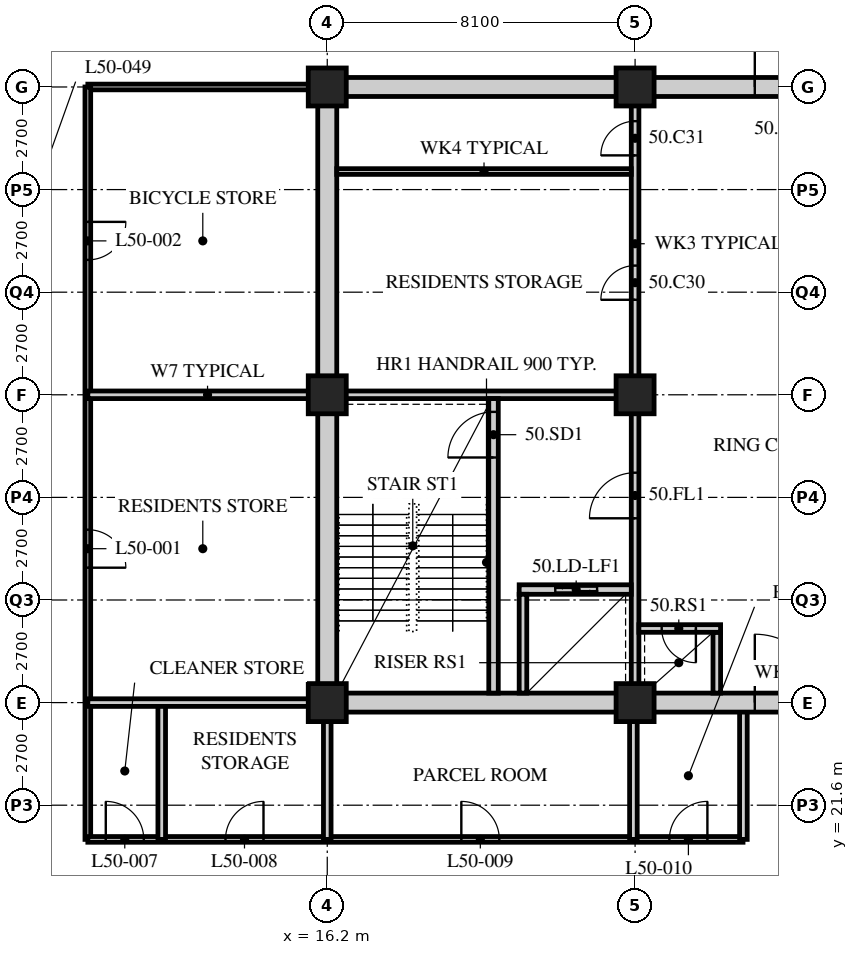
"""IFC4 building model, lengths in metres.
Left out: names, types, materials, properties, quantities, classifications, styles, units other than length and angle.
Written with IfcOpenShell. Run it as: python <this file> out.ifc"""

import sys

from ifc_helpers import new_model, si_unit, direction, frame, frame_2d, origin, origin_2d, place, context, subcontext, project, spatial, rectangle, hollow_rectangle, extrude, element, fill, save


model = new_model("IFC4")
c1 = context("Model", 3, precision=1e-05, world=origin(), true_north=direction((0.0, 1.0)))
c2 = subcontext(c1, "Body", "Model", "MODEL_VIEW")
j1 = project(units=[si_unit("LENGTHUNIT", "METRE"), si_unit("PLANEANGLEUNIT", "RADIAN")], contexts=[c1])
p1 = place(None, origin())
s1 = spatial("IfcSite", under=j1, at=p1, CompositionType="ELEMENT")
p2 = place(p1, origin())
s2 = spatial("IfcBuilding", under=s1, at=p2, CompositionType="ELEMENT")
p3 = place(p2, frame((0.0, 0.0, 195.6)))
s3 = spatial("IfcBuildingStorey", under=s2, at=p3, CompositionType="ELEMENT", Elevation=195.6)
for number, where, z_axis, x_axis in (
    (1, (16.2, 24.3, 0.0), (0.0, 0.0, 1.0), (1.0, 0.0, 0.0)),
    (2, (16.2, 32.4, 0.0), (0.0, 0.0, 1.0), (1.0, 0.0, 0.0)),
    (3, (16.2, 40.5, 0.0), (0.0, 0.0, 1.0), (1.0, 0.0, 0.0)),
    (4, (24.3, 24.3, 0.0), (0.0, 0.0, 1.0), (1.0, 0.0, 0.0)),
    (5, (24.3, 32.4, 0.0), (0.0, 0.0, 1.0), (1.0, 0.0, 0.0)),
    (6, (24.3, 40.5, 0.0), (0.0, 0.0, 1.0), (1.0, 0.0, 0.0)),
):
    element("IfcColumn", number, at=place(p3, frame(where, z_axis=z_axis, x_axis=x_axis)), inside=s3, PredefinedType="COLUMN", context=c2, shape_type="SweptSolid", body=[
        extrude(hollow_rectangle(XDim=1.0, YDim=1.0, WallThickness=0.1, at=origin_2d()), origin(), (0.0, 0.0, 1.0), 3.6),
    ])
p4 = place(p3, frame((16.0, 40.5, 0.0), z_axis=(0.0, 0.0, 1.0), x_axis=(-1.0, 0.0, 0.0)))
e7 = element("IfcWall", 7, at=p4, inside=s3, PredefinedType="PARTITIONING", context=c2, shape_type="SweptSolid", body=[
    extrude(rectangle(XDim=6.1, YDim=0.15, at=frame_2d((3.05, 0.0))), origin(), (0.0, 0.0, 1.0), 3.39),
])
p5 = place(p3, frame((9.9, 40.5, 0.0), z_axis=(0.0, 0.0, 1.0), x_axis=(0.0, -1.0, 0.0)))
e8 = element("IfcWall", 8, at=p5, inside=s3, PredefinedType="PARTITIONING", context=c2, shape_type="SweptSolid", body=[
    extrude(rectangle(XDim=19.8, YDim=0.15, at=frame_2d((9.9, 0.0))), origin(), (0.0, 0.0, 1.0), 3.39),
])
p6 = place(p5, frame((11.65, 0.0, 0.0)))
e9 = element("IfcOpeningElement", 9, at=p6, cuts=e8, PredefinedType="OPENING", context=c2, shape_type="SweptSolid", body=[
    extrude(rectangle(XDim=1.0, YDim=2.1, at=frame_2d((0.5, 1.05))), frame((0.0, 0.085, 0.0), z_axis=(0.0, -1.0, 0.0), x_axis=(1.0, 0.0, 0.0)), (0.0, 0.0, 1.0), 0.17),
])
p7 = place(p5, frame((3.55, 0.0, 0.0)))
e10 = element("IfcOpeningElement", 10, at=p7, cuts=e8, PredefinedType="OPENING", context=c2, shape_type="SweptSolid", body=[
    extrude(rectangle(XDim=1.0, YDim=2.1, at=frame_2d((0.5, 1.05))), frame((0.0, 0.085, 0.0), z_axis=(0.0, -1.0, 0.0), x_axis=(1.0, 0.0, 0.0)), (0.0, 0.0, 1.0), 0.17),
])
p8 = place(p3, frame((9.9, 20.7, 0.0), z_axis=(0.0, 0.0, 1.0), x_axis=(1.0, 0.0, 0.0)))
e11 = element("IfcWall", 11, at=p8, inside=s3, PredefinedType="PARTITIONING", context=c2, shape_type="SweptSolid", body=[
    extrude(rectangle(XDim=17.24, YDim=0.15, at=frame_2d((8.62, 0.0))), origin(), (0.0, 0.0, 1.0), 3.39),
])
p9 = place(p8, frame((0.472, 0.0, 0.0)))
e12 = element("IfcOpeningElement", 12, at=p9, cuts=e11, PredefinedType="OPENING", context=c2, shape_type="SweptSolid", body=[
    extrude(rectangle(XDim=1.0, YDim=2.1, at=frame_2d((0.5, 1.05))), frame((0.0, 0.085, 0.0), z_axis=(0.0, -1.0, 0.0), x_axis=(1.0, 0.0, 0.0)), (0.0, 0.0, 1.0), 0.17),
])
p10 = place(p8, frame((3.622, 0.0, 0.0)))
e13 = element("IfcOpeningElement", 13, at=p10, cuts=e11, PredefinedType="OPENING", context=c2, shape_type="SweptSolid", body=[
    extrude(rectangle(XDim=1.0, YDim=2.1, at=frame_2d((0.5, 1.05))), frame((0.0, 0.085, 0.0), z_axis=(0.0, -1.0, 0.0), x_axis=(1.0, 0.0, 0.0)), (0.0, 0.0, 1.0), 0.17),
])
p11 = place(p8, frame((9.828, 0.0, 0.0)))
e14 = element("IfcOpeningElement", 14, at=p11, cuts=e11, PredefinedType="OPENING", context=c2, shape_type="SweptSolid", body=[
    extrude(rectangle(XDim=1.0, YDim=2.1, at=frame_2d((0.5, 1.05))), frame((0.0, 0.085, 0.0), z_axis=(0.0, -1.0, 0.0), x_axis=(1.0, 0.0, 0.0)), (0.0, 0.0, 1.0), 0.17),
])
p12 = place(p8, frame((15.303, 0.0, 0.0)))
e15 = element("IfcOpeningElement", 15, at=p12, cuts=e11, PredefinedType="OPENING", context=c2, shape_type="SweptSolid", body=[
    extrude(rectangle(XDim=1.0, YDim=2.1, at=frame_2d((0.5, 1.05))), frame((0.0, 0.085, 0.0), z_axis=(0.0, -1.0, 0.0), x_axis=(1.0, 0.0, 0.0)), (0.0, 0.0, 1.0), 0.17),
])
p13 = place(p3, frame((9.9, 32.4, 0.0), z_axis=(0.0, 0.0, 1.0), x_axis=(1.0, 0.0, 0.0)))
e16 = element("IfcWall", 16, at=p13, inside=s3, PredefinedType="SOLIDWALL", context=c2, shape_type="SweptSolid", body=[
    extrude(rectangle(XDim=6.3, YDim=0.2, at=frame_2d((3.15, 0.0))), origin(), (0.0, 0.0, 1.0), 3.39),
])
p14 = place(p3, frame((16.2, 20.7, 0.0), z_axis=(0.0, 0.0, 1.0), x_axis=(0.0, 1.0, 0.0)))
e17 = element("IfcWall", 17, at=p14, inside=s3, PredefinedType="SOLIDWALL", context=c2, shape_type="SweptSolid", body=[
    extrude(rectangle(XDim=3.6, YDim=0.2, at=frame_2d((1.8, 0.0))), origin(), (0.0, 0.0, 1.0), 2.778),
])
p15 = place(p3, frame((11.844, 20.7, 0.0), z_axis=(0.0, 0.0, 1.0), x_axis=(0.0, 1.0, 0.0)))
e18 = element("IfcWall", 18, at=p15, inside=s3, PredefinedType="SOLIDWALL", context=c2, shape_type="SweptSolid", body=[
    extrude(rectangle(XDim=3.6, YDim=0.2, at=frame_2d((1.8, 0.0))), origin(), (0.0, 0.0, 1.0), 3.39),
])
p16 = place(p3, frame((24.256, 20.7, 0.0), z_axis=(0.0, 0.0, 1.0), x_axis=(0.0, 1.0, 0.0)))
e19 = element("IfcWall", 19, at=p16, inside=s3, PredefinedType="SOLIDWALL", context=c2, shape_type="SweptSolid", body=[
    extrude(rectangle(XDim=3.6, YDim=0.2, at=frame_2d((1.8, 0.0))), origin(), (0.0, 0.0, 1.0), 2.778),
])
p17 = place(p3, frame((27.15, 20.7, 0.0), z_axis=(0.0, 0.0, 1.0), x_axis=(0.0, 1.0, 0.0)))
e20 = element("IfcWall", 20, at=p17, inside=s3, PredefinedType="SOLIDWALL", context=c2, shape_type="SweptSolid", body=[
    extrude(rectangle(XDim=3.6, YDim=0.2, at=frame_2d((1.8, 0.0))), origin(), (0.0, 0.0, 1.0), 3.39),
])
p18 = place(p3, frame((9.9, 24.3, 0.0), z_axis=(0.0, 0.0, 1.0), x_axis=(1.0, 0.0, 0.0)))
e21 = element("IfcWall", 21, at=p18, inside=s3, PredefinedType="SOLIDWALL", context=c2, shape_type="SweptSolid", body=[
    extrude(rectangle(XDim=6.3, YDim=0.2, at=frame_2d((3.15, 0.0))), origin(), (0.0, 0.0, 1.0), 3.39),
])
p19 = place(p3, frame((15.95, 24.3, 0.0), z_axis=(0.0, 0.0, 1.0), x_axis=(1.0, 0.0, 0.0)))
e22 = element("IfcWall", 22, at=p19, inside=s3, PredefinedType="SOLIDWALL", context=c2, shape_type="SweptSolid", body=[
    extrude(rectangle(XDim=24.8, YDim=0.5, at=frame_2d((12.4, 0.0))), origin(), (0.0, 0.0, 1.0), 2.74),
])
p20 = place(p19, frame((11.5, 0.0, 0.0)))
e23 = element("IfcOpeningElement", 23, at=p20, cuts=e22, PredefinedType="OPENING", context=c2, shape_type="SweptSolid", body=[
    extrude(rectangle(XDim=1.8, YDim=2.4, at=frame_2d((0.9, 1.2))), frame((0.0, 0.26, 0.0), z_axis=(0.0, -1.0, 0.0), x_axis=(1.0, 0.0, 0.0)), (0.0, 0.0, 1.0), 0.52),
])
p21 = place(p3, frame((15.95, 40.5, 0.0), z_axis=(0.0, 0.0, 1.0), x_axis=(1.0, 0.0, 0.0)))
e24 = element("IfcWall", 24, at=p21, inside=s3, PredefinedType="SOLIDWALL", context=c2, shape_type="SweptSolid", body=[
    extrude(rectangle(XDim=24.8, YDim=0.5, at=frame_2d((12.4, 0.0))), origin(), (0.0, 0.0, 1.0), 2.74),
])
p22 = place(p21, frame((11.5, 0.0, 0.0)))
e25 = element("IfcOpeningElement", 25, at=p22, cuts=e24, PredefinedType="OPENING", context=c2, shape_type="SweptSolid", body=[
    extrude(rectangle(XDim=1.8, YDim=2.4, at=frame_2d((0.9, 1.2))), frame((0.0, 0.26, 0.0), z_axis=(0.0, -1.0, 0.0), x_axis=(1.0, 0.0, 0.0)), (0.0, 0.0, 1.0), 0.52),
])
p23 = place(p3, frame((16.2, 24.55, 0.0), z_axis=(0.0, 0.0, 1.0), x_axis=(0.0, 1.0, 0.0)))
e26 = element("IfcWall", 26, at=p23, inside=s3, PredefinedType="SOLIDWALL", context=c2, shape_type="SweptSolid", body=[
    extrude(rectangle(XDim=15.7, YDim=0.5, at=frame_2d((7.85, 0.0))), origin(), (0.0, 0.0, 1.0), 2.778),
])
p24 = place(p3, frame((16.45, 32.4, 0.0), z_axis=(0.0, 0.0, 1.0), x_axis=(1.0, 0.0, 0.0)))
e27 = element("IfcWall", 27, at=p24, inside=s3, PredefinedType="SOLIDWALL", context=c2, shape_type="SweptSolid", body=[
    extrude(rectangle(XDim=7.95, YDim=0.2, at=frame_2d((3.975, 0.0))), origin(), (0.0, 0.0, 1.0), 2.778),
])
p25 = place(p3, frame((24.3, 24.55, 0.0), z_axis=(0.0, 0.0, 1.0), x_axis=(0.0, 1.0, 0.0)))
e28 = element("IfcWall", 28, at=p25, inside=s3, PredefinedType="SOLIDWALL", context=c2, shape_type="SweptSolid", body=[
    extrude(rectangle(XDim=7.75, YDim=0.2, at=frame_2d((3.875, 0.0))), origin(), (0.0, 0.0, 1.0), 2.778),
])
p26 = place(p25, frame((4.6, 0.0, 0.0)))
e29 = element("IfcOpeningElement", 29, at=p26, cuts=e28, PredefinedType="OPENING", context=c2, shape_type="SweptSolid", body=[
    extrude(rectangle(XDim=1.2, YDim=2.1, at=frame_2d((0.6, 1.05))), frame((0.0, 0.11, 0.0), z_axis=(0.0, -1.0, 0.0), x_axis=(1.0, 0.0, 0.0)), (0.0, 0.0, 1.0), 0.22),
])
p27 = place(p3, frame((20.575, 24.55, 0.0), z_axis=(0.0, 0.0, 1.0), x_axis=(0.0, 1.0, 0.0)))
e30 = element("IfcWall", 30, at=p27, inside=s3, PredefinedType="SOLIDWALL", context=c2, shape_type="SweptSolid", body=[
    extrude(rectangle(XDim=7.75, YDim=0.25, at=frame_2d((3.875, 0.0))), origin(), (0.0, 0.0, 1.0), 3.39),
])
p28 = place(p27, frame((6.2, 0.0, 0.0)))
e31 = element("IfcOpeningElement", 31, at=p28, cuts=e30, PredefinedType="OPENING", context=c2, shape_type="SweptSolid", body=[
    extrude(rectangle(XDim=1.2, YDim=2.1, at=frame_2d((0.6, 1.05))), frame((0.0, 0.135, 0.0), z_axis=(0.0, -1.0, 0.0), x_axis=(1.0, 0.0, 0.0)), (0.0, 0.0, 1.0), 0.27),
])
p29 = place(p3, frame((21.25, 27.275, 0.0), z_axis=(0.0, 0.0, 1.0), x_axis=(1.0, 0.0, 0.0)))
e32 = element("IfcWall", 32, at=p29, inside=s3, PredefinedType="SOLIDWALL", context=c2, shape_type="SweptSolid", body=[
    extrude(rectangle(XDim=2.95, YDim=0.25, at=frame_2d((1.475, 0.0))), origin(), (0.0, 0.0, 1.0), 3.39),
])
p30 = place(p29, frame((0.95, 0.0, 0.0)))
e33 = element("IfcOpeningElement", 33, at=p30, cuts=e32, PredefinedType="OPENING", context=c2, shape_type="SweptSolid", body=[
    extrude(rectangle(XDim=1.1, YDim=2.4, at=frame_2d((0.55, 1.2))), frame((0.0, 0.135, 0.0), z_axis=(0.0, -1.0, 0.0), x_axis=(1.0, 0.0, 0.0)), (0.0, 0.0, 1.0), 0.27),
])
p31 = place(p3, frame((21.35, 24.55, 0.0), z_axis=(0.0, 0.0, 1.0), x_axis=(0.0, 1.0, 0.0)))
e34 = element("IfcWall", 34, at=p31, inside=s3, PredefinedType="SOLIDWALL", context=c2, shape_type="SweptSolid", body=[
    extrude(rectangle(XDim=2.6, YDim=0.2, at=frame_2d((1.3, 0.0))), origin(), (0.0, 0.0, 1.0), 3.39),
])
p32 = place(p3, frame((26.45, 24.55, 0.0), z_axis=(0.0, 0.0, 1.0), x_axis=(0.0, 1.0, 0.0)))
e35 = element("IfcWall", 35, at=p32, inside=s3, PredefinedType="SOLIDWALL", context=c2, shape_type="SweptSolid", body=[
    extrude(rectangle(XDim=1.6, YDim=0.2, at=frame_2d((0.8, 0.0))), origin(), (0.0, 0.0, 1.0), 3.39),
])
p33 = place(p3, frame((24.4, 26.25, 0.0), z_axis=(0.0, 0.0, 1.0), x_axis=(1.0, 0.0, 0.0)))
e36 = element("IfcWall", 36, at=p33, inside=s3, PredefinedType="SOLIDWALL", context=c2, shape_type="SweptSolid", body=[
    extrude(rectangle(XDim=2.15, YDim=0.2, at=frame_2d((1.075, 0.0))), origin(), (0.0, 0.0, 1.0), 3.39),
])
p34 = place(p33, frame((0.6, 0.0, 0.0)))
e37 = element("IfcOpeningElement", 37, at=p34, cuts=e36, PredefinedType="OPENING", context=c2, shape_type="SweptSolid", body=[
    extrude(rectangle(XDim=0.9, YDim=2.1, at=frame_2d((0.45, 1.05))), frame((0.0, 0.11, 0.0), z_axis=(0.0, -1.0, 0.0), x_axis=(1.0, 0.0, 0.0)), (0.0, 0.0, 1.0), 0.22),
])
p35 = place(p3, frame((24.3, 32.5, 0.0), z_axis=(0.0, 0.0, 1.0), x_axis=(0.0, 1.0, 0.0)))
e38 = element("IfcWall", 38, at=p35, inside=s3, PredefinedType="PARTITIONING", context=c2, shape_type="SweptSolid", body=[
    extrude(rectangle(XDim=7.75, YDim=0.2, at=frame_2d((3.875, 0.0))), origin(), (0.0, 0.0, 1.0), 2.778),
])
p36 = place(p35, frame((2.4, 0.0, 0.0)))
e39 = element("IfcOpeningElement", 39, at=p36, cuts=e38, PredefinedType="OPENING", context=c2, shape_type="SweptSolid", body=[
    extrude(rectangle(XDim=0.9, YDim=2.1, at=frame_2d((0.45, 1.05))), frame((0.0, 0.11, 0.0), z_axis=(0.0, -1.0, 0.0), x_axis=(1.0, 0.0, 0.0)), (0.0, 0.0, 1.0), 0.22),
])
p37 = place(p35, frame((6.2, 0.0, 0.0)))
e40 = element("IfcOpeningElement", 40, at=p37, cuts=e38, PredefinedType="OPENING", context=c2, shape_type="SweptSolid", body=[
    extrude(rectangle(XDim=0.9, YDim=2.1, at=frame_2d((0.45, 1.05))), frame((0.0, 0.11, 0.0), z_axis=(0.0, -1.0, 0.0), x_axis=(1.0, 0.0, 0.0)), (0.0, 0.0, 1.0), 0.22),
])
p38 = place(p3, frame((16.45, 38.275, 0.0), z_axis=(0.0, 0.0, 1.0), x_axis=(1.0, 0.0, 0.0)))
e41 = element("IfcWall", 41, at=p38, inside=s3, PredefinedType="PARTITIONING", context=c2, shape_type="SweptSolid", body=[
    extrude(rectangle(XDim=7.75, YDim=0.15, at=frame_2d((3.875, 0.0))), origin(), (0.0, 0.0, 1.0), 3.39),
])
p39 = place(p6, origin())
e42 = element("IfcDoor", 42, at=p39, inside=s3, OperationType="SINGLE_SWING_RIGHT", PredefinedType="DOOR", context=c2, shape_type="SweptSolid", body=[
    extrude(rectangle(XDim=1.0, YDim=2.1, at=frame_2d((0.5, 1.05))), frame((0.0, 0.025, 0.0), z_axis=(0.0, -1.0, 0.0), x_axis=(1.0, 0.0, 0.0)), (0.0, 0.0, 1.0), 0.05),
])
fill(e9, e42)
p40 = place(p7, origin())
e43 = element("IfcDoor", 43, at=p40, inside=s3, OperationType="SINGLE_SWING_LEFT", PredefinedType="DOOR", context=c2, shape_type="SweptSolid", body=[
    extrude(rectangle(XDim=1.0, YDim=2.1, at=frame_2d((0.5, 1.05))), frame((0.0, 0.025, 0.0), z_axis=(0.0, -1.0, 0.0), x_axis=(1.0, 0.0, 0.0)), (0.0, 0.0, 1.0), 0.05),
])
fill(e10, e43)
p41 = place(p9, origin())
e44 = element("IfcDoor", 44, at=p41, inside=s3, OperationType="SINGLE_SWING_LEFT", PredefinedType="DOOR", context=c2, shape_type="SweptSolid", body=[
    extrude(rectangle(XDim=1.0, YDim=2.1, at=frame_2d((0.5, 1.05))), frame((0.0, 0.025, 0.0), z_axis=(0.0, -1.0, 0.0), x_axis=(1.0, 0.0, 0.0)), (0.0, 0.0, 1.0), 0.05),
])
fill(e12, e44)
p42 = place(p10, origin())
e45 = element("IfcDoor", 45, at=p42, inside=s3, OperationType="SINGLE_SWING_RIGHT", PredefinedType="DOOR", context=c2, shape_type="SweptSolid", body=[
    extrude(rectangle(XDim=1.0, YDim=2.1, at=frame_2d((0.5, 1.05))), frame((0.0, 0.025, 0.0), z_axis=(0.0, -1.0, 0.0), x_axis=(1.0, 0.0, 0.0)), (0.0, 0.0, 1.0), 0.05),
])
fill(e13, e45)
p43 = place(p11, origin())
e46 = element("IfcDoor", 46, at=p43, inside=s3, OperationType="SINGLE_SWING_LEFT", PredefinedType="DOOR", context=c2, shape_type="SweptSolid", body=[
    extrude(rectangle(XDim=1.0, YDim=2.1, at=frame_2d((0.5, 1.05))), frame((0.0, 0.025, 0.0), z_axis=(0.0, -1.0, 0.0), x_axis=(1.0, 0.0, 0.0)), (0.0, 0.0, 1.0), 0.05),
])
fill(e14, e46)
p44 = place(p12, origin())
e47 = element("IfcDoor", 47, at=p44, inside=s3, OperationType="SINGLE_SWING_RIGHT", PredefinedType="DOOR", context=c2, shape_type="SweptSolid", body=[
    extrude(rectangle(XDim=1.0, YDim=2.1, at=frame_2d((0.5, 1.05))), frame((0.0, 0.025, 0.0), z_axis=(0.0, -1.0, 0.0), x_axis=(1.0, 0.0, 0.0)), (0.0, 0.0, 1.0), 0.05),
])
fill(e15, e47)
p45 = place(p36, origin())
e48 = element("IfcDoor", 48, at=p45, inside=s3, OperationType="SINGLE_SWING_LEFT", PredefinedType="DOOR", context=c2, shape_type="SweptSolid", body=[
    extrude(rectangle(XDim=0.9, YDim=2.1, at=frame_2d((0.45, 1.05))), frame((0.0, 0.025, 0.0), z_axis=(0.0, -1.0, 0.0), x_axis=(1.0, 0.0, 0.0)), (0.0, 0.0, 1.0), 0.05),
])
fill(e39, e48)
p46 = place(p37, origin())
e49 = element("IfcDoor", 49, at=p46, inside=s3, OperationType="SINGLE_SWING_LEFT", PredefinedType="DOOR", context=c2, shape_type="SweptSolid", body=[
    extrude(rectangle(XDim=0.9, YDim=2.1, at=frame_2d((0.45, 1.05))), frame((0.0, 0.025, 0.0), z_axis=(0.0, -1.0, 0.0), x_axis=(1.0, 0.0, 0.0)), (0.0, 0.0, 1.0), 0.05),
])
fill(e40, e49)
p47 = place(p28, origin())
e50 = element("IfcDoor", 50, at=p47, inside=s3, OperationType="SINGLE_SWING_LEFT", PredefinedType="DOOR", context=c2, shape_type="SweptSolid", body=[
    extrude(rectangle(XDim=1.2, YDim=2.1, at=frame_2d((0.6, 1.05))), frame((0.0, 0.025, 0.0), z_axis=(0.0, -1.0, 0.0), x_axis=(1.0, 0.0, 0.0)), (0.0, 0.0, 1.0), 0.05),
])
fill(e31, e50)
p48 = place(p26, origin())
e51 = element("IfcDoor", 51, at=p48, inside=s3, OperationType="SINGLE_SWING_LEFT", PredefinedType="DOOR", context=c2, shape_type="SweptSolid", body=[
    extrude(rectangle(XDim=1.2, YDim=2.1, at=frame_2d((0.6, 1.05))), frame((0.0, 0.025, 0.0), z_axis=(0.0, -1.0, 0.0), x_axis=(1.0, 0.0, 0.0)), (0.0, 0.0, 1.0), 0.05),
])
fill(e29, e51)
p49 = place(p34, origin())
e52 = element("IfcDoor", 52, at=p49, inside=s3, OperationType="SINGLE_SWING_LEFT", PredefinedType="DOOR", context=c2, shape_type="SweptSolid", body=[
    extrude(rectangle(XDim=0.9, YDim=2.1, at=frame_2d((0.45, 1.05))), frame((0.0, 0.025, 0.0), z_axis=(0.0, -1.0, 0.0), x_axis=(1.0, 0.0, 0.0)), (0.0, 0.0, 1.0), 0.05),
])
fill(e37, e52)
p50 = place(p30, origin())
e53 = element("IfcDoor", 53, at=p50, inside=s3, OperationType="DOUBLE_DOOR_SLIDING", PredefinedType="DOOR", context=c2, shape_type="SweptSolid", body=[
    extrude(rectangle(XDim=1.1, YDim=2.4, at=frame_2d((0.55, 1.2))), frame((0.0, 0.025, 0.0), z_axis=(0.0, -1.0, 0.0), x_axis=(1.0, 0.0, 0.0)), (0.0, 0.0, 1.0), 0.05),
])
fill(e33, e53)
p51 = place(p20, origin())
e54 = element("IfcDoor", 54, at=p51, inside=s3, OperationType="DOUBLE_DOOR_SINGLE_SWING", PredefinedType="DOOR", context=c2, shape_type="SweptSolid", body=[
    extrude(rectangle(XDim=1.8, YDim=2.4, at=frame_2d((0.9, 1.2))), frame((0.0, 0.025, 0.0), z_axis=(0.0, -1.0, 0.0), x_axis=(1.0, 0.0, 0.0)), (0.0, 0.0, 1.0), 0.05),
])
fill(e23, e54)
p52 = place(p22, origin())
e55 = element("IfcDoor", 55, at=p52, inside=s3, OperationType="DOUBLE_DOOR_SINGLE_SWING", PredefinedType="DOOR", context=c2, shape_type="SweptSolid", body=[
    extrude(rectangle(XDim=1.8, YDim=2.4, at=frame_2d((0.9, 1.2))), frame((0.0, 0.025, 0.0), z_axis=(0.0, -1.0, 0.0), x_axis=(1.0, 0.0, 0.0)), (0.0, 0.0, 1.0), 0.05),
])
fill(e25, e55)
save(model, sys.argv[1])
